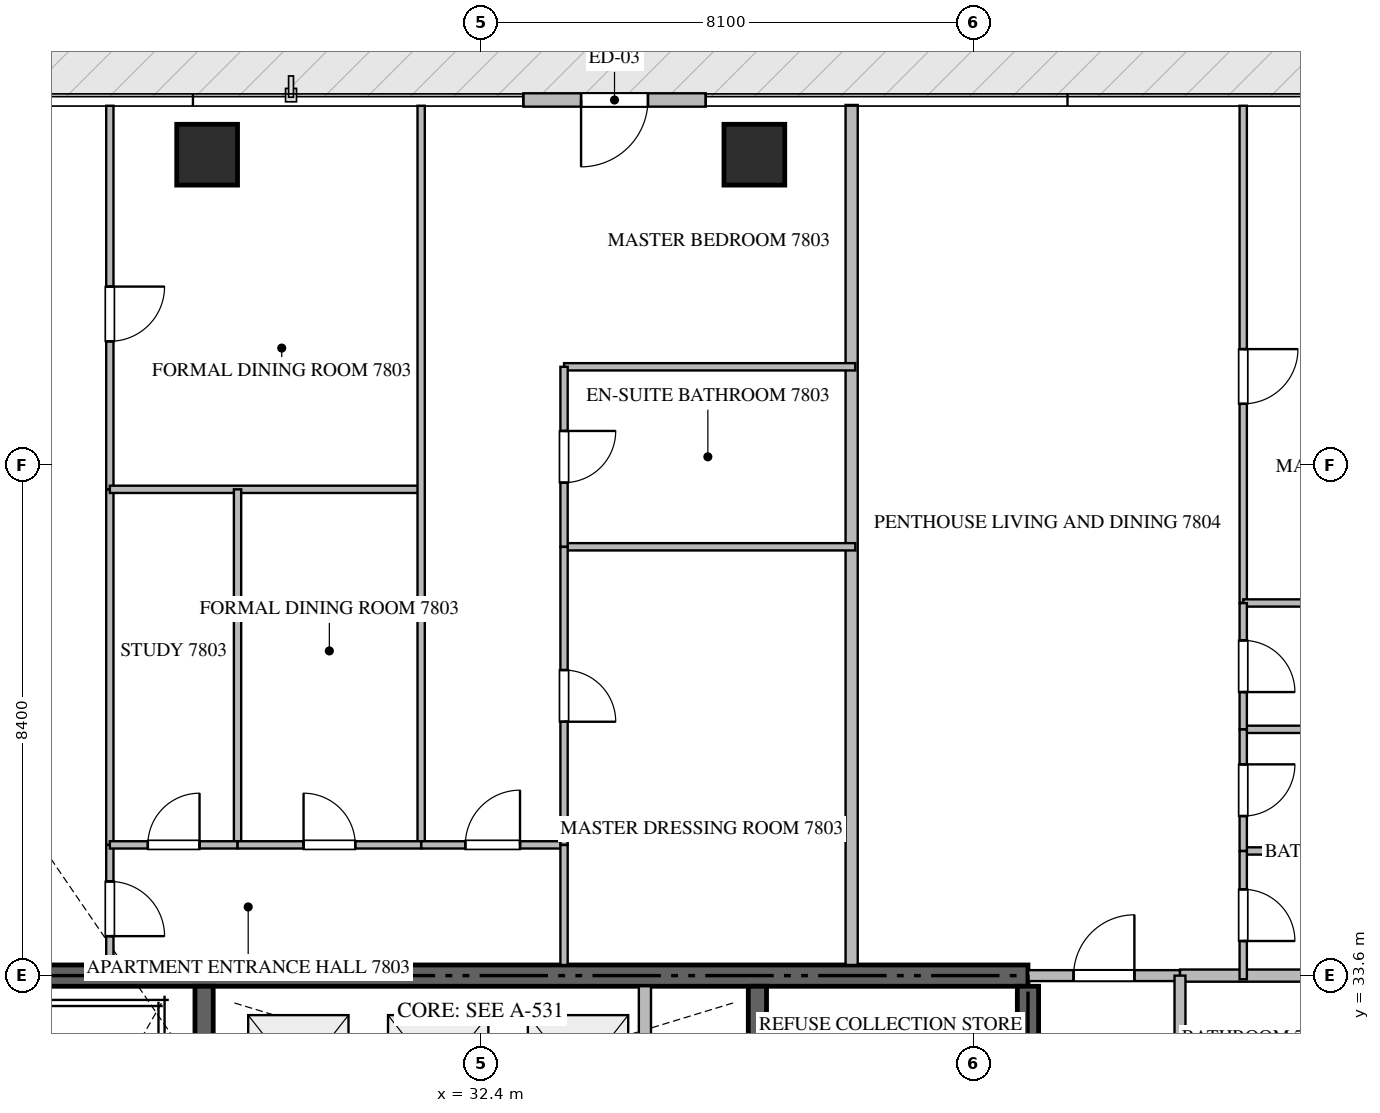
"""IFC4 building model, lengths in metres.
Left out: names, types, materials, properties, quantities, classifications, styles, units other than length and angle.
Written with IfcOpenShell. Run it as: python <this file> out.ifc"""

import sys

from ifc_helpers import new_model, si_unit, direction, frame, frame_2d, origin, origin_2d, place, context, subcontext, project, spatial, rectangle, extrude, source, transform, mapped, element, fill, save


model = new_model("IFC4")
c1 = context("Model", 3, precision=1e-05, world=origin(), true_north=direction((0.0, 1.0)))
c2 = subcontext(c1, "Body", "Model", "MODEL_VIEW")
j1 = project(units=[si_unit("LENGTHUNIT", "METRE"), si_unit("PLANEANGLEUNIT", "RADIAN")], contexts=[c1])
p1 = place(None, origin())
s1 = spatial("IfcSite", under=j1, at=p1, CompositionType="ELEMENT")
p2 = place(p1, origin())
s2 = spatial("IfcBuilding", under=s1, at=p2, CompositionType="ELEMENT")
p3 = place(p2, frame((0.0, 0.0, 313.7)))
s3 = spatial("IfcBuildingStorey", under=s2, at=p3, CompositionType="ELEMENT", Elevation=313.7)
p4 = place(p3, frame((41.4, 33.6, -0.26), z_axis=(0.0, 0.0, 1.0), x_axis=(-1.0, 0.0, 0.0)))
e1 = element("IfcWall", 1, at=p4, inside=s3, PredefinedType="SHEAR", context=c2, shape_type="SweptSolid", body=[
    extrude(rectangle(XDim=18.0, YDim=0.35, at=frame_2d((9.0, 0.0))), origin(), (0.0, 0.0, 1.0), 4.048),
])
p5 = place(p3, frame((41.4, 27.75, -0.26), z_axis=(0.0, 0.0, 1.0), x_axis=(0.0, 1.0, 0.0)))
e2 = element("IfcWall", 2, at=p5, inside=s3, PredefinedType="SHEAR", context=c2, shape_type="SweptSolid", body=[
    extrude(rectangle(XDim=5.675, YDim=0.35, at=frame_2d((2.837, 0.0))), origin(), (0.0, 0.0, 1.0), 4.048),
])
p6 = place(p3, frame((27.85, 23.55, -0.26), z_axis=(0.0, 0.0, 1.0), x_axis=(0.0, 1.0, 0.0)))
e3 = element("IfcWall", 3, at=p6, inside=s3, PredefinedType="SHEAR", context=c2, shape_type="SweptSolid", body=[
    extrude(rectangle(XDim=9.875, YDim=0.3, at=frame_2d((4.938, 0.0))), origin(), (0.0, 0.0, 1.0), 4.048),
])
p7 = place(p3, frame((36.95, 27.05, -0.26), z_axis=(0.0, 0.0, 1.0), x_axis=(0.0, 1.0, 0.0)))
e4 = element("IfcWall", 4, at=p7, inside=s3, PredefinedType="SHEAR", context=c2, shape_type="SweptSolid", body=[
    extrude(rectangle(XDim=6.375, YDim=0.3, at=frame_2d((3.188, 0.0))), origin(), (0.0, 0.0, 1.0), 4.048),
])
m1 = source(origin(), c2, "Body", "SweptSolid", [
    extrude(rectangle(XDim=1.0, YDim=1.0, at=origin_2d()), origin(), (0.0, 0.0, 1.0), 4.05),
])
for number, where, z_axis, x_axis in (
    (5, (27.9, 47.1, -0.26), (0.0, 0.0, 1.0), (1.0, 0.0, 0.0)),
    (6, (36.9, 47.1, -0.26), (0.0, 0.0, 1.0), (1.0, 0.0, 0.0)),
):
    element("IfcColumn", number, at=place(p3, frame(where, z_axis=z_axis, x_axis=x_axis)), inside=s3, PredefinedType="COLUMN", context=c2, shape_type="MappedRepresentation", body=[
        mapped(m1, transform((0.0, 0.0, 0.0), scale=1.0)),
    ])
p8 = place(p3, frame((36.1, 48.0, 0.0), z_axis=(0.0, 0.0, 1.0), x_axis=(-1.0, 0.0, 0.0)))
e7 = element("IfcWall", 7, at=p8, inside=s3, PredefinedType="ELEMENTEDWALL", context=c2, shape_type="SweptSolid", body=[
    extrude(rectangle(XDim=3.0, YDim=0.22, at=frame_2d((1.5, 0.0))), origin(), (0.0, 0.0, 1.0), 3.775),
])
p9 = place(p8, frame((0.95, 0.0, 0.0)))
e8 = element("IfcOpeningElement", 8, at=p9, cuts=e7, PredefinedType="OPENING", context=c2, shape_type="SweptSolid", body=[
    extrude(rectangle(XDim=1.1, YDim=2.2, at=frame_2d((0.55, 1.1))), frame((0.0, 0.12, 0.0), z_axis=(0.0, -1.0, 0.0), x_axis=(1.0, 0.0, 0.0)), (0.0, 0.0, 1.0), 0.24),
])
p10 = place(p3, frame((35.1, 30.75, 0.0), z_axis=(0.0, 0.0, 1.0), x_axis=(0.0, 1.0, 0.0)))
e9 = element("IfcWall", 9, at=p10, inside=s3, PredefinedType="STANDARD", context=c2, shape_type="SweptSolid", body=[
    extrude(rectangle(XDim=2.675, YDim=0.2, at=frame_2d((1.337, 0.0))), origin(), (0.0, 0.0, 1.0), 3.79),
])
p11 = place(p3, frame((38.5, 33.775, 0.0), z_axis=(0.0, 0.0, 1.0), x_axis=(0.0, 1.0, 0.0)))
e10 = element("IfcWall", 10, at=p11, inside=s3, PredefinedType="PARTITIONING", context=c2, shape_type="SweptSolid", body=[
    extrude(rectangle(XDim=14.143, YDim=0.2, at=frame_2d((7.072, 0.0))), origin(), (0.0, 0.0, 1.0), 3.79),
])
p12 = place(p3, frame((43.9, 33.6, 0.0), z_axis=(0.0, 0.0, 1.0), x_axis=(1.0, 0.0, 0.0)))
e11 = element("IfcWall", 11, at=p12, inside=s3, PredefinedType="PARTITIONING", context=c2, shape_type="SweptSolid", body=[
    extrude(rectangle(XDim=11.618, YDim=0.2, at=frame_2d((5.809, 0.0))), origin(), (0.0, 0.0, 1.0), 3.79),
])
p13 = place(p3, frame((41.402, 33.6, 0.0), z_axis=(0.0, 0.0, 1.0), x_axis=(1.0, 0.0, 0.0)))
e12 = element("IfcWall", 12, at=p13, inside=s3, PredefinedType="PARTITIONING", context=c2, shape_type="SweptSolid", body=[
    extrude(rectangle(XDim=2.496, YDim=0.18, at=frame_2d((1.248, 0.0))), origin(), (0.0, 0.0, 1.0), 3.79),
])
p14 = place(p13, frame((0.748, 0.0, 0.0)))
e13 = element("IfcOpeningElement", 13, at=p14, cuts=e12, PredefinedType="OPENING", context=c2, shape_type="SweptSolid", body=[
    extrude(rectangle(XDim=1.0, YDim=2.15, at=frame_2d((0.5, 1.075))), frame((0.0, 0.1, 0.0), z_axis=(0.0, -1.0, 0.0), x_axis=(1.0, 0.0, 0.0)), (0.0, 0.0, 1.0), 0.2),
])
p15 = place(p3, frame((43.9, 16.8, 0.0), z_axis=(0.0, 0.0, 1.0), x_axis=(0.0, 1.0, 0.0)))
e14 = element("IfcWall", 14, at=p15, inside=s3, PredefinedType="PARTITIONING", context=c2, shape_type="SweptSolid", body=[
    extrude(rectangle(XDim=16.8, YDim=0.18, at=frame_2d((8.4, 0.0))), origin(), (0.0, 0.0, 1.0), 3.79),
])
p16 = place(p15, frame((2.67, 0.0, 0.0)))
e15 = element("IfcOpeningElement", 15, at=p16, cuts=e14, PredefinedType="OPENING", context=c2, shape_type="SweptSolid", body=[
    extrude(rectangle(XDim=1.0, YDim=2.15, at=frame_2d((0.5, 1.075))), frame((0.0, 0.1, 0.0), z_axis=(0.0, -1.0, 0.0), x_axis=(1.0, 0.0, 0.0)), (0.0, 0.0, 1.0), 0.2),
])
p17 = place(p15, frame((11.107, 0.0, 0.0)))
e16 = element("IfcOpeningElement", 16, at=p17, cuts=e14, PredefinedType="OPENING", context=c2, shape_type="SweptSolid", body=[
    extrude(rectangle(XDim=1.0, YDim=2.15, at=frame_2d((0.5, 1.075))), frame((0.0, 0.1, 0.0), z_axis=(0.0, -1.0, 0.0), x_axis=(1.0, 0.0, 0.0)), (0.0, 0.0, 1.0), 0.2),
])
p18 = place(p3, frame((26.3, 35.75, 0.0), z_axis=(0.0, 0.0, 1.0), x_axis=(0.0, -1.0, 0.0)))
e17 = element("IfcWall", 17, at=p18, inside=s3, PredefinedType="PARTITIONING", context=c2, shape_type="SweptSolid", body=[
    extrude(rectangle(XDim=1.975, YDim=0.12, at=frame_2d((0.988, 0.0))), origin(), (0.0, 0.0, 1.0), 3.79),
])
p19 = place(p18, frame((0.601, 0.0, 0.0)))
e18 = element("IfcOpeningElement", 18, at=p19, cuts=e17, PredefinedType="OPENING", context=c2, shape_type="SweptSolid", body=[
    extrude(rectangle(XDim=0.9, YDim=2.1, at=frame_2d((0.45, 1.05))), frame((0.0, 0.07, 0.0), z_axis=(0.0, -1.0, 0.0), x_axis=(1.0, 0.0, 0.0)), (0.0, 0.0, 1.0), 0.14),
])
p20 = place(p3, frame((26.3, 47.905, 0.0), z_axis=(0.0, 0.0, 1.0), x_axis=(0.0, -1.0, 0.0)))
e19 = element("IfcWall", 19, at=p20, inside=s3, PredefinedType="PARTITIONING", context=c2, shape_type="SweptSolid", body=[
    extrude(rectangle(XDim=6.308, YDim=0.12, at=frame_2d((3.154, 0.0))), origin(), (0.0, 0.0, 1.0), 3.79),
])
p21 = place(p20, frame((2.974, 0.0, 0.0)))
e20 = element("IfcOpeningElement", 20, at=p21, cuts=e19, PredefinedType="OPENING", context=c2, shape_type="SweptSolid", body=[
    extrude(rectangle(XDim=0.9, YDim=2.1, at=frame_2d((0.45, 1.05))), frame((0.0, 0.07, 0.0), z_axis=(0.0, -1.0, 0.0), x_axis=(1.0, 0.0, 0.0)), (0.0, 0.0, 1.0), 0.14),
])
p22 = place(p3, frame((26.3, 41.595, 0.0), z_axis=(0.0, 0.0, 1.0), x_axis=(0.0, -1.0, 0.0)))
e21 = element("IfcWall", 21, at=p22, inside=s3, PredefinedType="PARTITIONING", context=c2, shape_type="SweptSolid", body=[
    extrude(rectangle(XDim=5.843, YDim=0.12, at=frame_2d((2.921, 0.0))), origin(), (0.0, 0.0, 1.0), 3.79),
])
p23 = place(p3, frame((26.3, 41.597, 0.0), z_axis=(0.0, 0.0, 1.0), x_axis=(1.0, 0.0, 0.0)))
e22 = element("IfcWall", 22, at=p23, inside=s3, PredefinedType="PARTITIONING", context=c2, shape_type="SweptSolid", body=[
    extrude(rectangle(XDim=5.12, YDim=0.12, at=frame_2d((2.56, 0.0))), origin(), (0.0, 0.0, 1.0), 3.79),
])
p24 = place(p3, frame((31.42, 47.905, 0.0), z_axis=(0.0, 0.0, 1.0), x_axis=(0.0, -1.0, 0.0)))
e23 = element("IfcWall", 23, at=p24, inside=s3, PredefinedType="PARTITIONING", context=c2, shape_type="SweptSolid", body=[
    extrude(rectangle(XDim=12.155, YDim=0.12, at=frame_2d((6.078, 0.0))), origin(), (0.0, 0.0, 1.0), 3.79),
])
p25 = place(p3, frame((28.4, 41.597, 0.0), z_axis=(0.0, 0.0, 1.0), x_axis=(0.0, -1.0, 0.0)))
e24 = element("IfcWall", 24, at=p25, inside=s3, PredefinedType="PARTITIONING", context=c2, shape_type="SweptSolid", body=[
    extrude(rectangle(XDim=5.847, YDim=0.12, at=frame_2d((2.923, 0.0))), origin(), (0.0, 0.0, 1.0), 3.79),
])
p26 = place(p3, frame((26.3, 35.75, 0.0), z_axis=(0.0, 0.0, 1.0), x_axis=(1.0, 0.0, 0.0)))
e25 = element("IfcWall", 25, at=p26, inside=s3, PredefinedType="PARTITIONING", context=c2, shape_type="SweptSolid", body=[
    extrude(rectangle(XDim=2.1, YDim=0.12, at=frame_2d((1.05, 0.0))), origin(), (0.0, 0.0, 1.0), 3.79),
])
p27 = place(p26, frame((0.625, 0.0, 0.0)))
e26 = element("IfcOpeningElement", 26, at=p27, cuts=e25, PredefinedType="OPENING", context=c2, shape_type="SweptSolid", body=[
    extrude(rectangle(XDim=0.85, YDim=2.1, at=frame_2d((0.425, 1.05))), frame((0.0, 0.07, 0.0), z_axis=(0.0, -1.0, 0.0), x_axis=(1.0, 0.0, 0.0)), (0.0, 0.0, 1.0), 0.14),
])
p28 = place(p3, frame((28.402, 35.75, 0.0), z_axis=(0.0, 0.0, 1.0), x_axis=(1.0, 0.0, 0.0)))
e27 = element("IfcWall", 27, at=p28, inside=s3, PredefinedType="PARTITIONING", context=c2, shape_type="SweptSolid", body=[
    extrude(rectangle(XDim=3.018, YDim=0.12, at=frame_2d((1.509, 0.0))), origin(), (0.0, 0.0, 1.0), 3.79),
])
p29 = place(p28, frame((1.084, 0.0, 0.0)))
e28 = element("IfcOpeningElement", 28, at=p29, cuts=e27, PredefinedType="OPENING", context=c2, shape_type="SweptSolid", body=[
    extrude(rectangle(XDim=0.85, YDim=2.1, at=frame_2d((0.425, 1.05))), frame((0.0, 0.07, 0.0), z_axis=(0.0, -1.0, 0.0), x_axis=(1.0, 0.0, 0.0)), (0.0, 0.0, 1.0), 0.14),
])
p30 = place(p3, frame((31.422, 35.75, 0.0), z_axis=(0.0, 0.0, 1.0), x_axis=(1.0, 0.0, 0.0)))
e29 = element("IfcWall", 29, at=p30, inside=s3, PredefinedType="PARTITIONING", context=c2, shape_type="SweptSolid", body=[
    extrude(rectangle(XDim=2.348, YDim=0.12, at=frame_2d((1.174, 0.0))), origin(), (0.0, 0.0, 1.0), 3.79),
])
p31 = place(p30, frame((0.724, 0.0, 0.0)))
e30 = element("IfcOpeningElement", 30, at=p31, cuts=e29, PredefinedType="OPENING", context=c2, shape_type="SweptSolid", body=[
    extrude(rectangle(XDim=0.9, YDim=2.1, at=frame_2d((0.45, 1.05))), frame((0.0, 0.07, 0.0), z_axis=(0.0, -1.0, 0.0), x_axis=(1.0, 0.0, 0.0)), (0.0, 0.0, 1.0), 0.14),
])
for number, where, z_axis, x_axis in (
    (31, (33.77, 43.612, 0.0), (0.0, 0.0, 1.0), (1.0, 0.0, 0.0)),
    (32, (33.77, 40.652, 0.0), (0.0, 0.0, 1.0), (1.0, 0.0, 0.0)),
):
    element("IfcWall", number, at=place(p3, frame(where, z_axis=z_axis, x_axis=x_axis)), inside=s3, PredefinedType="PARTITIONING", context=c2, shape_type="SweptSolid", body=[
        extrude(rectangle(XDim=4.79, YDim=0.12, at=frame_2d((2.395, 0.0))), origin(), (0.0, 0.0, 1.0), 3.79),
    ])
p32 = place(p3, frame((33.77, 43.612, 0.0), z_axis=(0.0, 0.0, 1.0), x_axis=(0.0, -1.0, 0.0)))
e33 = element("IfcWall", 33, at=p32, inside=s3, PredefinedType="PARTITIONING", context=c2, shape_type="SweptSolid", body=[
    extrude(rectangle(XDim=2.96, YDim=0.12, at=frame_2d((1.48, 0.0))), origin(), (0.0, 0.0, 1.0), 3.79),
])
p33 = place(p32, frame((1.055, 0.0, 0.0)))
e34 = element("IfcOpeningElement", 34, at=p33, cuts=e33, PredefinedType="OPENING", context=c2, shape_type="SweptSolid", body=[
    extrude(rectangle(XDim=0.85, YDim=2.1, at=frame_2d((0.425, 1.05))), frame((0.0, 0.07, 0.0), z_axis=(0.0, -1.0, 0.0), x_axis=(1.0, 0.0, 0.0)), (0.0, 0.0, 1.0), 0.14),
])
p34 = place(p3, frame((33.77, 40.65, 0.0), z_axis=(0.0, 0.0, 1.0), x_axis=(0.0, -1.0, 0.0)))
e35 = element("IfcWall", 35, at=p34, inside=s3, PredefinedType="PARTITIONING", context=c2, shape_type="SweptSolid", body=[
    extrude(rectangle(XDim=4.9, YDim=0.12, at=frame_2d((2.45, 0.0))), origin(), (0.0, 0.0, 1.0), 3.79),
])
p35 = place(p34, frame((2.025, 0.0, 0.0)))
e36 = element("IfcOpeningElement", 36, at=p35, cuts=e35, PredefinedType="OPENING", context=c2, shape_type="SweptSolid", body=[
    extrude(rectangle(XDim=0.85, YDim=2.1, at=frame_2d((0.425, 1.05))), frame((0.0, 0.07, 0.0), z_axis=(0.0, -1.0, 0.0), x_axis=(1.0, 0.0, 0.0)), (0.0, 0.0, 1.0), 0.14),
])
p36 = place(p3, frame((33.77, 35.748, 0.0), z_axis=(0.0, 0.0, 1.0), x_axis=(0.0, -1.0, 0.0)))
e37 = element("IfcWall", 37, at=p36, inside=s3, PredefinedType="PARTITIONING", context=c2, shape_type="SweptSolid", body=[
    extrude(rectangle(XDim=1.973, YDim=0.12, at=frame_2d((0.987, 0.0))), origin(), (0.0, 0.0, 1.0), 3.79),
])
p37 = place(p3, frame((44.94, 47.905, 0.0), z_axis=(0.0, 0.0, 1.0), x_axis=(0.0, -1.0, 0.0)))
e38 = element("IfcWall", 38, at=p37, inside=s3, PredefinedType="PARTITIONING", context=c2, shape_type="SweptSolid", body=[
    extrude(rectangle(XDim=8.177, YDim=0.12, at=frame_2d((4.088, 0.0))), origin(), (0.0, 0.0, 1.0), 3.79),
])
p38 = place(p37, frame((4.002, 0.0, 0.0)))
e39 = element("IfcOpeningElement", 39, at=p38, cuts=e38, PredefinedType="OPENING", context=c2, shape_type="SweptSolid", body=[
    extrude(rectangle(XDim=0.9, YDim=2.1, at=frame_2d((0.45, 1.05))), frame((0.0, 0.07, 0.0), z_axis=(0.0, -1.0, 0.0), x_axis=(1.0, 0.0, 0.0)), (0.0, 0.0, 1.0), 0.14),
])
p39 = place(p3, frame((44.94, 39.728, 0.0), z_axis=(0.0, 0.0, 1.0), x_axis=(1.0, 0.0, 0.0)))
e40 = element("IfcWall", 40, at=p39, inside=s3, PredefinedType="PARTITIONING", context=c2, shape_type="SweptSolid", body=[
    extrude(rectangle(XDim=10.565, YDim=0.12, at=frame_2d((5.282, 0.0))), origin(), (0.0, 0.0, 1.0), 3.292),
])
p40 = place(p3, frame((44.94, 37.65, 0.0), z_axis=(0.0, 0.0, 1.0), x_axis=(1.0, 0.0, 0.0)))
e41 = element("IfcWall", 41, at=p40, inside=s3, PredefinedType="PARTITIONING", context=c2, shape_type="SweptSolid", body=[
    extrude(rectangle(XDim=10.565, YDim=0.12, at=frame_2d((5.282, 0.0))), origin(), (0.0, 0.0, 1.0), 3.79),
])
p41 = place(p3, frame((44.94, 35.65, 0.0), z_axis=(0.0, 0.0, 1.0), x_axis=(1.0, 0.0, 0.0)))
e42 = element("IfcWall", 42, at=p41, inside=s3, PredefinedType="PARTITIONING", context=c2, shape_type="SweptSolid", body=[
    extrude(rectangle(XDim=3.2, YDim=0.12, at=frame_2d((1.6, 0.0))), origin(), (0.0, 0.0, 1.0), 3.79),
])
p42 = place(p3, frame((44.94, 39.726, 0.0), z_axis=(0.0, 0.0, 1.0), x_axis=(0.0, -1.0, 0.0)))
e43 = element("IfcWall", 43, at=p42, inside=s3, PredefinedType="PARTITIONING", context=c2, shape_type="SweptSolid", body=[
    extrude(rectangle(XDim=2.076, YDim=0.12, at=frame_2d((1.038, 0.0))), origin(), (0.0, 0.0, 1.0), 3.79),
])
p43 = place(p42, frame((0.613, 0.0, 0.0)))
e44 = element("IfcOpeningElement", 44, at=p43, cuts=e43, PredefinedType="OPENING", context=c2, shape_type="SweptSolid", body=[
    extrude(rectangle(XDim=0.85, YDim=2.1, at=frame_2d((0.425, 1.05))), frame((0.0, 0.07, 0.0), z_axis=(0.0, -1.0, 0.0), x_axis=(1.0, 0.0, 0.0)), (0.0, 0.0, 1.0), 0.14),
])
p44 = place(p3, frame((44.94, 37.648, 0.0), z_axis=(0.0, 0.0, 1.0), x_axis=(0.0, -1.0, 0.0)))
e45 = element("IfcWall", 45, at=p44, inside=s3, PredefinedType="PARTITIONING", context=c2, shape_type="SweptSolid", body=[
    extrude(rectangle(XDim=1.998, YDim=0.12, at=frame_2d((0.999, 0.0))), origin(), (0.0, 0.0, 1.0), 3.79),
])
p45 = place(p44, frame((0.574, 0.0, 0.0)))
e46 = element("IfcOpeningElement", 46, at=p45, cuts=e45, PredefinedType="OPENING", context=c2, shape_type="SweptSolid", body=[
    extrude(rectangle(XDim=0.85, YDim=2.1, at=frame_2d((0.425, 1.05))), frame((0.0, 0.07, 0.0), z_axis=(0.0, -1.0, 0.0), x_axis=(1.0, 0.0, 0.0)), (0.0, 0.0, 1.0), 0.14),
])
p46 = place(p3, frame((44.94, 35.648, 0.0), z_axis=(0.0, 0.0, 1.0), x_axis=(0.0, -1.0, 0.0)))
e47 = element("IfcWall", 47, at=p46, inside=s3, PredefinedType="PARTITIONING", context=c2, shape_type="SweptSolid", body=[
    extrude(rectangle(XDim=2.108, YDim=0.12, at=frame_2d((1.054, 0.0))), origin(), (0.0, 0.0, 1.0), 3.79),
])
p47 = place(p46, frame((0.629, 0.0, 0.0)))
e48 = element("IfcOpeningElement", 48, at=p47, cuts=e47, PredefinedType="OPENING", context=c2, shape_type="SweptSolid", body=[
    extrude(rectangle(XDim=0.85, YDim=2.1, at=frame_2d((0.425, 1.05))), frame((0.0, 0.07, 0.0), z_axis=(0.0, -1.0, 0.0), x_axis=(1.0, 0.0, 0.0)), (0.0, 0.0, 1.0), 0.14),
])
m2 = source(origin(), c2, "Body", "SweptSolid", [
    extrude(rectangle(XDim=1.1, YDim=2.2, at=frame_2d((0.55, 1.1))), frame((0.0, 0.025, 0.0), z_axis=(0.0, -1.0, 0.0), x_axis=(1.0, 0.0, 0.0)), (0.0, 0.0, 1.0), 0.05),
])
p48 = place(p9, origin())
e49 = element("IfcDoor", 49, at=p48, inside=s3, OperationType="SINGLE_SWING_RIGHT", PredefinedType="DOOR", context=c2, shape_type="MappedRepresentation", body=[
    mapped(m2, transform((0.0, 0.0, 0.0), scale=1.0)),
])
fill(e8, e49)
m3 = source(origin(), c2, "Body", "SweptSolid", [
    extrude(rectangle(XDim=1.0, YDim=2.15, at=frame_2d((0.5, 1.075))), frame((0.0, 0.025, 0.0), z_axis=(0.0, -1.0, 0.0), x_axis=(1.0, 0.0, 0.0)), (0.0, 0.0, 1.0), 0.05),
])
p49 = place(p14, origin())
e50 = element("IfcDoor", 50, at=p49, inside=s3, OperationType="SINGLE_SWING_RIGHT", PredefinedType="DOOR", context=c2, shape_type="MappedRepresentation", body=[
    mapped(m3, transform((0.0, 0.0, 0.0), scale=1.0)),
])
fill(e13, e50)
m4 = source(origin(), c2, "Body", "SweptSolid", [
    extrude(rectangle(XDim=0.9, YDim=2.1, at=frame_2d((0.45, 1.05))), frame((0.0, 0.025, 0.0), z_axis=(0.0, -1.0, 0.0), x_axis=(1.0, 0.0, 0.0)), (0.0, 0.0, 1.0), 0.05),
])
p50 = place(p19, origin())
e51 = element("IfcDoor", 51, at=p50, inside=s3, OperationType="SINGLE_SWING_RIGHT", PredefinedType="DOOR", context=c2, shape_type="MappedRepresentation", body=[
    mapped(m4, transform((0.0, 0.0, 0.0), scale=1.0)),
])
fill(e18, e51)
p51 = place(p21, origin())
e52 = element("IfcDoor", 52, at=p51, inside=s3, OperationType="SINGLE_SWING_LEFT", PredefinedType="DOOR", context=c2, shape_type="MappedRepresentation", body=[
    mapped(m4, transform((0.0, 0.0, 0.0), scale=1.0)),
])
fill(e20, e52)
m5 = source(origin(), c2, "Body", "SweptSolid", [
    extrude(rectangle(XDim=0.85, YDim=2.1, at=frame_2d((0.425, 1.05))), frame((0.0, 0.025, 0.0), z_axis=(0.0, -1.0, 0.0), x_axis=(1.0, 0.0, 0.0)), (0.0, 0.0, 1.0), 0.05),
])
p52 = place(p27, origin())
e53 = element("IfcDoor", 53, at=p52, inside=s3, OperationType="SINGLE_SWING_RIGHT", PredefinedType="DOOR", context=c2, shape_type="MappedRepresentation", body=[
    mapped(m5, transform((0.0, 0.0, 0.0), scale=1.0)),
])
fill(e26, e53)
p53 = place(p29, origin())
e54 = element("IfcDoor", 54, at=p53, inside=s3, OperationType="SINGLE_SWING_LEFT", PredefinedType="DOOR", context=c2, shape_type="MappedRepresentation", body=[
    mapped(m5, transform((0.0, 0.0, 0.0), scale=1.0)),
])
fill(e28, e54)
p54 = place(p31, origin())
e55 = element("IfcDoor", 55, at=p54, inside=s3, OperationType="SINGLE_SWING_RIGHT", PredefinedType="DOOR", context=c2, shape_type="MappedRepresentation", body=[
    mapped(m4, transform((0.0, 0.0, 0.0), scale=1.0)),
])
fill(e30, e55)
p55 = place(p33, origin())
e56 = element("IfcDoor", 56, at=p55, inside=s3, OperationType="SINGLE_SWING_LEFT", PredefinedType="DOOR", context=c2, shape_type="MappedRepresentation", body=[
    mapped(m5, transform((0.0, 0.0, 0.0), scale=1.0)),
])
fill(e34, e56)
p56 = place(p35, origin())
e57 = element("IfcDoor", 57, at=p56, inside=s3, OperationType="SINGLE_SWING_RIGHT", PredefinedType="DOOR", context=c2, shape_type="MappedRepresentation", body=[
    mapped(m5, transform((0.0, 0.0, 0.0), scale=1.0)),
])
fill(e36, e57)
p57 = place(p38, origin())
e58 = element("IfcDoor", 58, at=p57, inside=s3, OperationType="SINGLE_SWING_LEFT", PredefinedType="DOOR", context=c2, shape_type="MappedRepresentation", body=[
    mapped(m4, transform((0.0, 0.0, 0.0), scale=1.0)),
])
fill(e39, e58)
p58 = place(p43, origin())
e59 = element("IfcDoor", 59, at=p58, inside=s3, OperationType="SINGLE_SWING_RIGHT", PredefinedType="DOOR", context=c2, shape_type="MappedRepresentation", body=[
    mapped(m5, transform((0.0, 0.0, 0.0), scale=1.0)),
])
fill(e44, e59)
p59 = place(p45, origin())
e60 = element("IfcDoor", 60, at=p59, inside=s3, OperationType="SINGLE_SWING_LEFT", PredefinedType="DOOR", context=c2, shape_type="MappedRepresentation", body=[
    mapped(m5, transform((0.0, 0.0, 0.0), scale=1.0)),
])
fill(e46, e60)
p60 = place(p47, origin())
e61 = element("IfcDoor", 61, at=p60, inside=s3, OperationType="SINGLE_SWING_RIGHT", PredefinedType="DOOR", context=c2, shape_type="MappedRepresentation", body=[
    mapped(m5, transform((0.0, 0.0, 0.0), scale=1.0)),
])
fill(e48, e61)
save(model, sys.argv[1])
